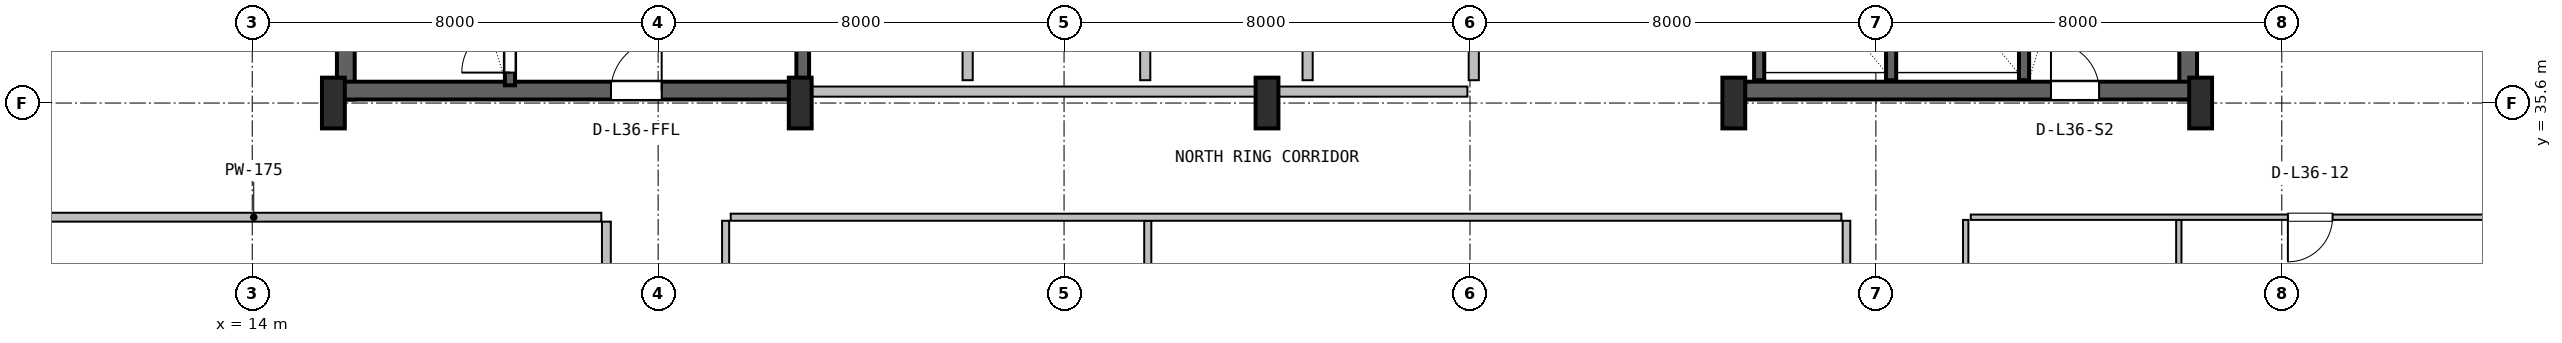
"""IFC4 building model, lengths in metres.
Left out: names, types, materials, properties, quantities, classifications, styles, units other than length and angle.
Written with IfcOpenShell. Run it as: python <this file> out.ifc"""

import sys

from ifc_helpers import new_model, si_unit, direction, frame, frame_2d, origin, origin_2d, place, context, subcontext, project, spatial, rectangle, i_section, extrude, source, transform, mapped, element, fill, save


model = new_model("IFC4")
c1 = context("Model", 3, precision=1e-05, world=origin(), true_north=direction((0.0, 1.0)))
c2 = subcontext(c1, "Body", "Model", "MODEL_VIEW")
j1 = project(units=[si_unit("LENGTHUNIT", "METRE"), si_unit("PLANEANGLEUNIT", "RADIAN")], contexts=[c1])
p1 = place(None, origin())
s1 = spatial("IfcSite", under=j1, at=p1, CompositionType="ELEMENT")
p2 = place(p1, origin())
s2 = spatial("IfcBuilding", under=s1, at=p2, CompositionType="ELEMENT")
p3 = place(p2, frame((0.0, 0.0, 149.6)))
s3 = spatial("IfcBuildingStorey", under=s2, at=p3, CompositionType="ELEMENT", Elevation=149.6)
for number, where, z_axis, x_axis in (
    (1, (15.845, 35.67, 0.0), (0.0, 0.0, 1.0), (0.0, 1.0, 0.0)),
    (2, (52.155, 35.67, 0.0), (0.0, 0.0, 1.0), (0.0, 1.0, 0.0)),
):
    element("IfcWall", number, at=place(p3, frame(where, z_axis=z_axis, x_axis=x_axis)), inside=s3, PredefinedType="SHEAR", context=c2, shape_type="SweptSolid", body=[
        extrude(rectangle(XDim=11.13, YDim=0.35, at=frame_2d((5.565, 0.0))), origin(), (0.0, 0.0, 1.0), 3.55),
    ])
p4 = place(p3, frame((15.67, 35.845, 0.0), z_axis=(0.0, 0.0, 1.0), x_axis=(1.0, 0.0, 0.0)))
e3 = element("IfcWall", 3, at=p4, inside=s3, PredefinedType="SHEAR", context=c2, shape_type="SweptSolid", body=[
    extrude(rectangle(XDim=9.13, YDim=0.35, at=frame_2d((4.565, 0.0))), origin(), (0.0, 0.0, 1.0), 3.55),
])
p5 = place(p4, frame((5.4, 0.0, 0.0)))
e4 = element("IfcOpeningElement", 4, at=p5, cuts=e3, PredefinedType="OPENING", context=c2, shape_type="SweptSolid", body=[
    extrude(rectangle(XDim=1.0, YDim=2.1, at=frame_2d((0.5, 1.05))), frame((0.0, 0.185, 0.0), z_axis=(0.0, -1.0, 0.0), x_axis=(1.0, 0.0, 0.0)), (0.0, 0.0, 1.0), 0.37),
])
p6 = place(p3, frame((43.2, 35.845, 0.0), z_axis=(0.0, 0.0, 1.0), x_axis=(1.0, 0.0, 0.0)))
e5 = element("IfcWall", 5, at=p6, inside=s3, PredefinedType="SHEAR", context=c2, shape_type="SweptSolid", body=[
    extrude(rectangle(XDim=9.13, YDim=0.35, at=frame_2d((4.565, 0.0))), origin(), (0.0, 0.0, 1.0), 3.55),
])
p7 = place(p6, frame((6.25, 0.0, 0.0)))
e6 = element("IfcOpeningElement", 6, at=p7, cuts=e5, PredefinedType="OPENING", context=c2, shape_type="SweptSolid", body=[
    extrude(rectangle(XDim=0.95, YDim=2.1, at=frame_2d((0.475, 1.05))), frame((0.0, 0.185, 0.0), z_axis=(0.0, -1.0, 0.0), x_axis=(1.0, 0.0, 0.0)), (0.0, 0.0, 1.0), 0.37),
])
m1 = source(origin(), c2, "Body", "SweptSolid", [
    extrude(i_section(OverallWidth=0.45, OverallDepth=1.0, WebThickness=0.016, FlangeThickness=0.03, FilletRadius=0.016, at=origin_2d()), origin(), (0.0, 0.0, 1.0), 3.8),
])
for number, where, z_axis, x_axis in (
    (7, (15.6, 35.6, 0.0), (0.0, 0.0, 1.0), (1.0, 0.0, 0.0)),
    (8, (24.8, 35.6, 0.0), (0.0, 0.0, 1.0), (1.0, 0.0, 0.0)),
    (9, (34.0, 35.6, 0.0), (0.0, 0.0, 1.0), (1.0, 0.0, 0.0)),
    (10, (43.2, 35.6, 0.0), (0.0, 0.0, 1.0), (1.0, 0.0, 0.0)),
    (11, (52.4, 35.6, 0.0), (0.0, 0.0, 1.0), (1.0, 0.0, 0.0)),
):
    element("IfcColumn", number, at=place(p3, frame(where, z_axis=z_axis, x_axis=x_axis)), inside=s3, PredefinedType="COLUMN", context=c2, shape_type="MappedRepresentation", body=[
        mapped(m1, transform((0.0, 0.0, 0.0), x_axis=(1.0, 0.0, 0.0), y_axis=(0.0, 1.0, 0.0), z_axis=(0.0, 0.0, 1.0), scale=1.0)),
    ])
p8 = place(p3, frame((19.08, 35.95, 0.0), z_axis=(0.0, 0.0, 1.0), x_axis=(0.0, 1.0, 0.0)))
e12 = element("IfcWall", 12, at=p8, inside=s3, PredefinedType="SHEAR", context=c2, shape_type="SweptSolid", body=[
    extrude(rectangle(XDim=9.65, YDim=0.2, at=frame_2d((4.825, 0.0))), origin(), (0.0, 0.0, 1.0), 3.55),
])
p9 = place(p8, frame((0.25, 0.0, 0.0)))
e13 = element("IfcOpeningElement", 13, at=p9, cuts=e12, PredefinedType="OPENING", context=c2, shape_type="SweptSolid", body=[
    extrude(rectangle(XDim=0.95, YDim=2.1, at=frame_2d((0.475, 1.05))), frame((0.0, 0.11, 0.0), z_axis=(0.0, -1.0, 0.0), x_axis=(1.0, 0.0, 0.0)), (0.0, 0.0, 1.0), 0.22),
])
p10 = place(p3, frame((24.85, 36.05, 0.0), z_axis=(0.0, 0.0, 1.0), x_axis=(0.0, 1.0, 0.0)))
e14 = element("IfcWall", 14, at=p10, inside=s3, PredefinedType="SHEAR", context=c2, shape_type="SweptSolid", body=[
    extrude(rectangle(XDim=10.45, YDim=0.25, at=frame_2d((5.225, 0.0))), origin(), (0.0, 0.0, 1.0), 3.55),
])
p11 = place(p3, frame((48.92, 36.05, 0.0), z_axis=(0.0, 0.0, 1.0), x_axis=(0.0, 1.0, 0.0)))
e15 = element("IfcWall", 15, at=p11, inside=s3, PredefinedType="SHEAR", context=c2, shape_type="SweptSolid", body=[
    extrude(rectangle(XDim=10.5, YDim=0.2, at=frame_2d((5.25, 0.0))), origin(), (0.0, 0.0, 1.0), 3.55),
])
for number, where, z_axis, x_axis in (
    (16, (43.7, 36.05, 0.0), (0.0, 0.0, 1.0), (0.0, 1.0, 0.0)),
    (17, (46.3, 36.05, 0.0), (0.0, 0.0, 1.0), (0.0, 1.0, 0.0)),
):
    element("IfcWall", number, at=place(p3, frame(where, z_axis=z_axis, x_axis=x_axis)), inside=s3, PredefinedType="SHEAR", context=c2, shape_type="SweptSolid", body=[
        extrude(rectangle(XDim=3.05, YDim=0.2, at=frame_2d((1.525, 0.0))), origin(), (0.0, 0.0, 1.0), 3.55),
    ])
p12 = place(p3, frame((25.0, 35.825, 0.0), z_axis=(0.0, 0.0, 1.0), x_axis=(1.0, 0.0, 0.0)))
e18 = element("IfcWall", 18, at=p12, inside=s3, PredefinedType="SOLIDWALL", context=c2, shape_type="SweptSolid", body=[
    extrude(rectangle(XDim=12.95, YDim=0.2, at=frame_2d((6.475, 0.0))), origin(), (0.0, 0.0, 1.0), 2.575),
])
for number, where, z_axis, x_axis in (
    (19, (28.1, 36.05, 0.0), (0.0, 0.0, 1.0), (0.0, 1.0, 0.0)),
    (20, (31.6, 36.05, 0.0), (0.0, 0.0, 1.0), (0.0, 1.0, 0.0)),
):
    element("IfcWall", number, at=place(p3, frame(where, z_axis=z_axis, x_axis=x_axis)), inside=s3, PredefinedType="PLUMBINGWALL", context=c2, shape_type="SweptSolid", body=[
        extrude(rectangle(XDim=3.1, YDim=0.2, at=frame_2d((1.55, 0.0))), origin(), (0.0, 0.0, 1.0), 3.53),
    ])
for number, where, z_axis, x_axis in (
    (21, (34.8, 36.05, 0.0), (0.0, 0.0, 1.0), (0.0, 1.0, 0.0)),
    (22, (38.075, 36.05, 0.0), (0.0, 0.0, 1.0), (0.0, 1.0, 0.0)),
):
    element("IfcWall", number, at=place(p3, frame(where, z_axis=z_axis, x_axis=x_axis)), inside=s3, PredefinedType="SOLIDWALL", context=c2, shape_type="SweptSolid", body=[
        extrude(rectangle(XDim=3.1, YDim=0.2, at=frame_2d((1.55, 0.0))), origin(), (0.0, 0.0, 1.0), 3.53),
    ])
p13 = place(p3, frame((20.98, 15.873, 0.0), z_axis=(0.0, 0.0, 1.0), x_axis=(0.0, 1.0, 0.0)))
e23 = element("IfcWall", 23, at=p13, inside=s3, PredefinedType="PARTITIONING", context=c2, shape_type="SweptSolid", body=[
    extrude(rectangle(XDim=17.39, YDim=0.175, at=frame_2d((8.695, 0.0))), origin(), (0.0, 0.0, 1.0), 3.222),
])
p14 = place(p13, frame((8.187, 0.0, 0.0)))
e24 = element("IfcOpeningElement", 24, at=p14, cuts=e23, PredefinedType="OPENING", context=c2, shape_type="SweptSolid", body=[
    extrude(rectangle(XDim=1.05, YDim=2.1, at=frame_2d((0.525, 1.05))), frame((0.0, 0.098, 0.0), z_axis=(0.0, -1.0, 0.0), x_axis=(1.0, 0.0, 0.0)), (0.0, 0.0, 1.0), 0.195),
])
p15 = place(p3, frame((7.18, 33.35, 0.0), z_axis=(0.0, 0.0, 1.0), x_axis=(1.0, 0.0, 0.0)))
e25 = element("IfcWall", 25, at=p15, inside=s3, PredefinedType="PARTITIONING", context=c2, shape_type="SweptSolid", body=[
    extrude(rectangle(XDim=13.7, YDim=0.175, at=frame_2d((6.85, 0.0))), origin(), (0.0, 0.0, 1.0), 3.108),
])
p16 = place(p3, frame((31.65, 18.24, 0.0), z_axis=(0.0, 0.0, 1.0), x_axis=(0.0, 1.0, 0.0)))
e26 = element("IfcWall", 26, at=p16, inside=s3, PredefinedType="PARTITIONING", context=c2, shape_type="SweptSolid", body=[
    extrude(rectangle(XDim=15.04, YDim=0.14, at=frame_2d((7.52, 0.0))), origin(), (0.0, 0.0, 1.0), 2.909),
])
p17 = place(p3, frame((23.43, 33.35, 0.0), z_axis=(0.0, 0.0, 1.0), x_axis=(1.0, 0.0, 0.0)))
e27 = element("IfcWall", 27, at=p17, inside=s3, PredefinedType="PARTITIONING", context=c2, shape_type="SweptSolid", body=[
    extrude(rectangle(XDim=21.89, YDim=0.14, at=frame_2d((10.945, 0.0))), origin(), (0.0, 0.0, 1.0), 2.909),
])
p18 = place(p3, frame((23.33, 18.24, 0.0), z_axis=(0.0, 0.0, 1.0), x_axis=(0.0, 1.0, 0.0)))
e28 = element("IfcWall", 28, at=p18, inside=s3, PredefinedType="PARTITIONING", context=c2, shape_type="SweptSolid", body=[
    extrude(rectangle(XDim=15.04, YDim=0.14, at=frame_2d((7.52, 0.0))), origin(), (0.0, 0.0, 1.0), 3.222),
])
p19 = place(p18, frame((7.02, 0.0, 0.0)))
e29 = element("IfcOpeningElement", 29, at=p19, cuts=e28, PredefinedType="OPENING", context=c2, shape_type="SweptSolid", body=[
    extrude(rectangle(XDim=1.0, YDim=2.1, at=frame_2d((0.5, 1.05))), frame((0.0, 0.08, 0.0), z_axis=(0.0, -1.0, 0.0), x_axis=(1.0, 0.0, 0.0)), (0.0, 0.0, 1.0), 0.16),
])
p20 = place(p3, frame((45.42, 18.24, 0.0), z_axis=(0.0, 0.0, 1.0), x_axis=(0.0, 1.0, 0.0)))
e30 = element("IfcWall", 30, at=p20, inside=s3, PredefinedType="PARTITIONING", context=c2, shape_type="SweptSolid", body=[
    extrude(rectangle(XDim=15.04, YDim=0.15, at=frame_2d((7.52, 0.0))), origin(), (0.0, 0.0, 1.0), 3.222),
])
p21 = place(p20, frame((7.08, 0.0, 0.0)))
e31 = element("IfcOpeningElement", 31, at=p21, cuts=e30, PredefinedType="OPENING", context=c2, shape_type="SweptSolid", body=[
    extrude(rectangle(XDim=0.88, YDim=2.06, at=frame_2d((0.44, 1.03))), frame((0.0, 0.085, 0.0), z_axis=(0.0, -1.0, 0.0), x_axis=(1.0, 0.0, 0.0)), (0.0, 0.0, 1.0), 0.17),
])
p22 = place(p3, frame((51.97, 15.873, 0.0), z_axis=(0.0, 0.0, 1.0), x_axis=(0.0, 1.0, 0.0)))
e32 = element("IfcWall", 32, at=p22, inside=s3, PredefinedType="PARTITIONING", context=c2, shape_type="SweptSolid", body=[
    extrude(rectangle(XDim=17.424, YDim=0.105, at=frame_2d((8.712, 0.0))), origin(), (0.0, 0.0, 1.0), 3.222),
])
p23 = place(p3, frame((47.87, 33.35, 0.0), z_axis=(0.0, 0.0, 1.0), x_axis=(1.0, 0.0, 0.0)))
e33 = element("IfcWall", 33, at=p23, inside=s3, PredefinedType="PARTITIONING", context=c2, shape_type="SweptSolid", body=[
    extrude(rectangle(XDim=12.95, YDim=0.105, at=frame_2d((6.475, 0.0))), origin(), (0.0, 0.0, 1.0), 3.108),
])
p24 = place(p23, frame((6.25, 0.0, 0.0)))
e34 = element("IfcOpeningElement", 34, at=p24, cuts=e33, PredefinedType="OPENING", context=c2, shape_type="SweptSolid", body=[
    extrude(rectangle(XDim=0.88, YDim=2.06, at=frame_2d((0.44, 1.03))), frame((0.0, 0.062, 0.0), z_axis=(0.0, -1.0, 0.0), x_axis=(1.0, 0.0, 0.0)), (0.0, 0.0, 1.0), 0.125),
])
p25 = place(p3, frame((47.77, 15.873, 0.0), z_axis=(0.0, 0.0, 1.0), x_axis=(0.0, 1.0, 0.0)))
e35 = element("IfcWall", 35, at=p25, inside=s3, PredefinedType="PARTITIONING", context=c2, shape_type="SweptSolid", body=[
    extrude(rectangle(XDim=17.424, YDim=0.105, at=frame_2d((8.712, 0.0))), origin(), (0.0, 0.0, 1.0), 3.222),
])
p26 = place(p25, frame((8.272, 0.0, 0.0)))
e36 = element("IfcOpeningElement", 36, at=p26, cuts=e35, PredefinedType="OPENING", context=c2, shape_type="SweptSolid", body=[
    extrude(rectangle(XDim=0.88, YDim=2.06, at=frame_2d((0.44, 1.03))), frame((0.0, 0.062, 0.0), z_axis=(0.0, -1.0, 0.0), x_axis=(1.0, 0.0, 0.0)), (0.0, 0.0, 1.0), 0.125),
])
m2 = source(origin(), c2, "Body", "SweptSolid", [
    extrude(rectangle(XDim=0.95, YDim=2.1, at=frame_2d((0.475, 1.05))), frame((0.0, 0.025, 0.0), z_axis=(0.0, -1.0, 0.0), x_axis=(1.0, 0.0, 0.0)), (0.0, 0.0, 1.0), 0.05),
])
p27 = place(p9, origin())
e37 = element("IfcDoor", 37, at=p27, inside=s3, OperationType="SINGLE_SWING_LEFT", PredefinedType="DOOR", context=c2, shape_type="MappedRepresentation", body=[
    mapped(m2, transform((0.0, 0.0, 0.0), x_axis=(1.0, 0.0, 0.0), y_axis=(0.0, 1.0, 0.0), z_axis=(0.0, 0.0, 1.0), scale=1.0)),
])
fill(e13, e37)
m3 = source(origin(), c2, "Body", "SweptSolid", [
    extrude(rectangle(XDim=1.0, YDim=2.1, at=frame_2d((0.5, 1.05))), frame((0.0, 0.025, 0.0), z_axis=(0.0, -1.0, 0.0), x_axis=(1.0, 0.0, 0.0)), (0.0, 0.0, 1.0), 0.05),
])
p28 = place(p5, origin())
e38 = element("IfcDoor", 38, at=p28, inside=s3, OperationType="SINGLE_SWING_RIGHT", PredefinedType="DOOR", context=c2, shape_type="MappedRepresentation", body=[
    mapped(m3, transform((0.0, 0.0, 0.0), x_axis=(1.0, 0.0, 0.0), y_axis=(0.0, 1.0, 0.0), z_axis=(0.0, 0.0, 1.0), scale=1.0)),
])
fill(e4, e38)
p29 = place(p7, origin())
e39 = element("IfcDoor", 39, at=p29, inside=s3, OperationType="SINGLE_SWING_LEFT", PredefinedType="DOOR", context=c2, shape_type="MappedRepresentation", body=[
    mapped(m2, transform((0.0, 0.0, 0.0), x_axis=(1.0, 0.0, 0.0), y_axis=(0.0, 1.0, 0.0), z_axis=(0.0, 0.0, 1.0), scale=1.0)),
])
fill(e6, e39)
m4 = source(origin(), c2, "Body", "SweptSolid", [
    extrude(rectangle(XDim=0.88, YDim=2.06, at=frame_2d((0.44, 1.03))), frame((0.0, 0.025, 0.0), z_axis=(0.0, -1.0, 0.0), x_axis=(1.0, 0.0, 0.0)), (0.0, 0.0, 1.0), 0.05),
])
p30 = place(p24, frame((0.88, 0.0, 0.0), z_axis=(0.0, 0.0, 1.0), x_axis=(-1.0, 0.0, 0.0)))
e40 = element("IfcDoor", 40, at=p30, inside=s3, OperationType="SINGLE_SWING_LEFT", PredefinedType="DOOR", context=c2, shape_type="MappedRepresentation", body=[
    mapped(m4, transform((0.0, 0.0, 0.0), x_axis=(1.0, 0.0, 0.0), y_axis=(0.0, 1.0, 0.0), z_axis=(0.0, 0.0, 1.0), scale=1.0)),
])
fill(e34, e40)
save(model, sys.argv[1])
